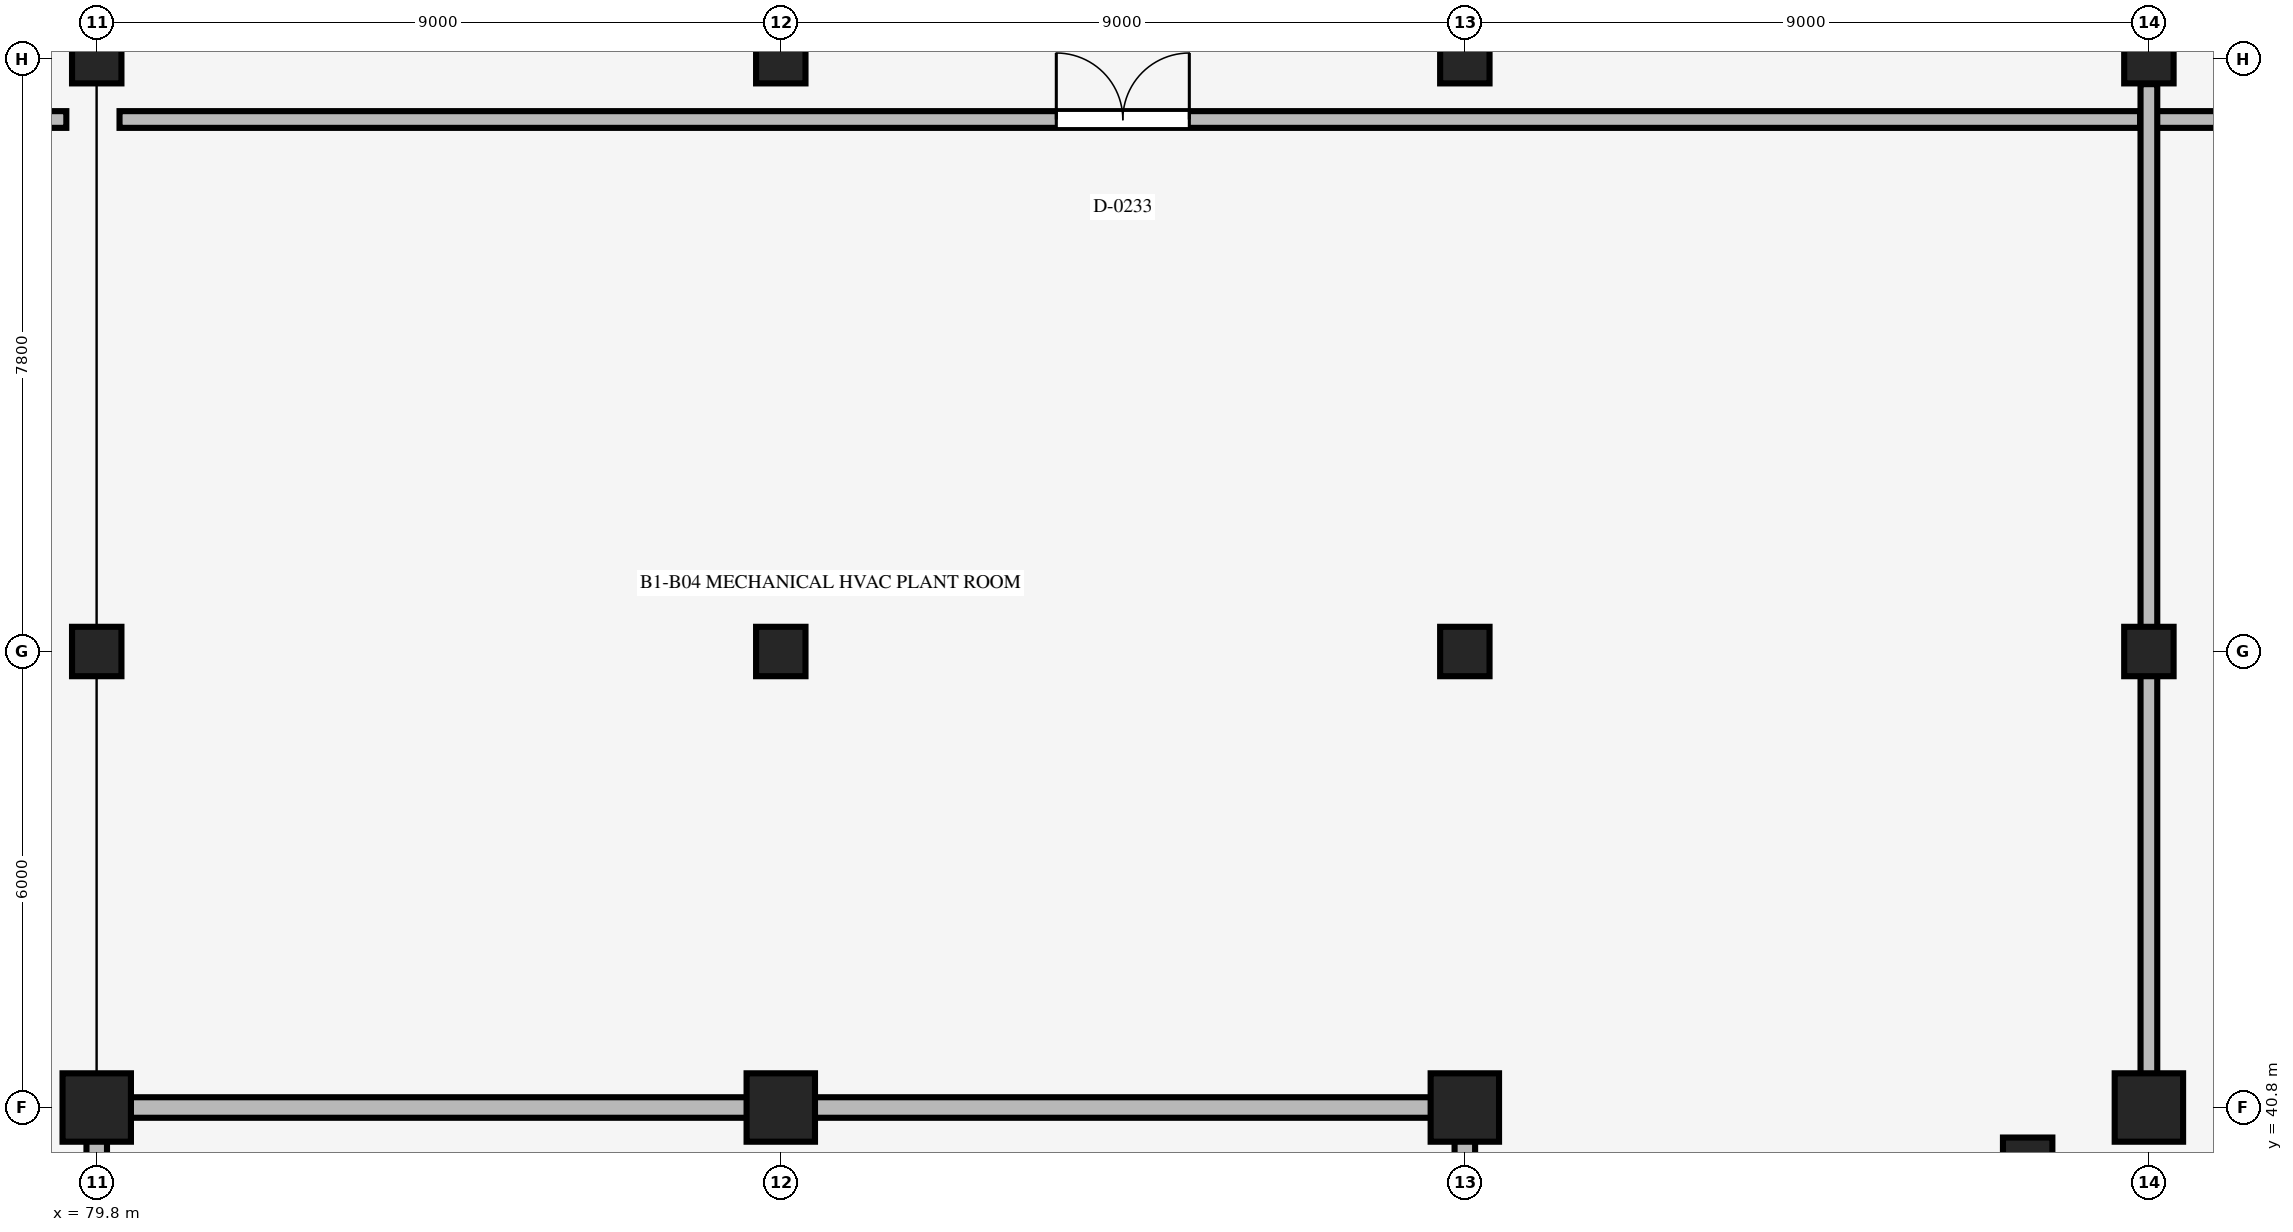
"""IFC4 building model, lengths in metres.
Left out: names, types, materials, properties, quantities, classifications, styles, units other than length and angle.
Written with IfcOpenShell. Run it as: python <this file> out.ifc"""

import sys

from ifc_helpers import new_model, si_unit, direction, frame, frame_2d, origin, origin_2d, place, context, subcontext, project, spatial, rectangle, extrude, element, fill, save


model = new_model("IFC4")
c1 = context("Model", 3, precision=1e-05, world=origin(), true_north=direction((0.0, 1.0)))
c2 = subcontext(c1, "Body", "Model", "MODEL_VIEW")
j1 = project(units=[si_unit("LENGTHUNIT", "METRE"), si_unit("PLANEANGLEUNIT", "RADIAN")], contexts=[c1])
p1 = place(None, origin())
s1 = spatial("IfcSite", under=j1, at=p1, CompositionType="ELEMENT")
p2 = place(p1, origin())
s2 = spatial("IfcBuilding", under=s1, at=p2, CompositionType="ELEMENT")
p3 = place(p2, frame((0.0, 0.0, -4.8)))
s3 = spatial("IfcBuildingStorey", under=s2, at=p3, CompositionType="ELEMENT", Elevation=-4.8)
p4 = place(p3, frame((79.8, 40.8, 0.0), z_axis=(0.0, 0.0, 1.0), x_axis=(1.0, 0.0, 0.0)))
e1 = element("IfcColumn", 1, at=p4, inside=s3, PredefinedType="COLUMN", context=c2, shape_type="SweptSolid", body=[
    extrude(rectangle(XDim=0.9, YDim=0.9, at=origin_2d()), origin(), (0.0, 0.0, 1.0), 4.8),
])
for number, where, z_axis, x_axis in (
    (2, (79.8, 46.8, 0.0), (0.0, 0.0, 1.0), (1.0, 0.0, 0.0)),
    (3, (79.8, 54.6, 0.0), (0.0, 0.0, 1.0), (1.0, 0.0, 0.0)),
):
    element("IfcColumn", number, at=place(p3, frame(where, z_axis=z_axis, x_axis=x_axis)), inside=s3, PredefinedType="COLUMN", context=c2, shape_type="SweptSolid", body=[
        extrude(rectangle(XDim=0.65, YDim=0.65, at=origin_2d()), origin(), (0.0, 0.0, 1.0), 4.8),
    ])
p5 = place(p3, frame((88.8, 40.8, 0.0), z_axis=(0.0, 0.0, 1.0), x_axis=(1.0, 0.0, 0.0)))
e4 = element("IfcColumn", 4, at=p5, inside=s3, PredefinedType="COLUMN", context=c2, shape_type="SweptSolid", body=[
    extrude(rectangle(XDim=0.9, YDim=0.9, at=origin_2d()), origin(), (0.0, 0.0, 1.0), 4.8),
])
for number, where, z_axis, x_axis in (
    (5, (88.8, 46.8, 0.0), (0.0, 0.0, 1.0), (1.0, 0.0, 0.0)),
    (6, (88.8, 54.6, 0.0), (0.0, 0.0, 1.0), (1.0, 0.0, 0.0)),
):
    element("IfcColumn", number, at=place(p3, frame(where, z_axis=z_axis, x_axis=x_axis)), inside=s3, PredefinedType="COLUMN", context=c2, shape_type="SweptSolid", body=[
        extrude(rectangle(XDim=0.65, YDim=0.65, at=origin_2d()), origin(), (0.0, 0.0, 1.0), 4.8),
    ])
p6 = place(p3, frame((97.8, 40.8, 0.0), z_axis=(0.0, 0.0, 1.0), x_axis=(1.0, 0.0, 0.0)))
e7 = element("IfcColumn", 7, at=p6, inside=s3, PredefinedType="COLUMN", context=c2, shape_type="SweptSolid", body=[
    extrude(rectangle(XDim=0.9, YDim=0.9, at=origin_2d()), origin(), (0.0, 0.0, 1.0), 4.8),
])
for number, where, z_axis, x_axis in (
    (8, (97.8, 46.8, 0.0), (0.0, 0.0, 1.0), (1.0, 0.0, 0.0)),
    (9, (97.8, 54.6, 0.0), (0.0, 0.0, 1.0), (1.0, 0.0, 0.0)),
):
    element("IfcColumn", number, at=place(p3, frame(where, z_axis=z_axis, x_axis=x_axis)), inside=s3, PredefinedType="COLUMN", context=c2, shape_type="SweptSolid", body=[
        extrude(rectangle(XDim=0.65, YDim=0.65, at=origin_2d()), origin(), (0.0, 0.0, 1.0), 4.8),
    ])
p7 = place(p3, frame((106.8, 40.8, 0.0), z_axis=(0.0, 0.0, 1.0), x_axis=(1.0, 0.0, 0.0)))
e10 = element("IfcColumn", 10, at=p7, inside=s3, PredefinedType="COLUMN", context=c2, shape_type="SweptSolid", body=[
    extrude(rectangle(XDim=0.9, YDim=0.9, at=origin_2d()), origin(), (0.0, 0.0, 1.0), 4.8),
])
p8 = place(p3, frame((105.205, 40.08, 0.0), z_axis=(0.0, 0.0, 1.0), x_axis=(1.0, 0.0, 0.0)))
e11 = element("IfcColumn", 11, at=p8, inside=s3, PredefinedType="COLUMN", context=c2, shape_type="SweptSolid", body=[
    extrude(rectangle(XDim=0.65, YDim=0.65, at=origin_2d()), origin(), (0.0, 0.0, 1.0), 4.755),
])
for number, where, z_axis, x_axis in (
    (12, (106.8, 46.8, 0.0), (0.0, 0.0, 1.0), (1.0, 0.0, 0.0)),
    (13, (106.8, 54.6, 0.0), (0.0, 0.0, 1.0), (1.0, 0.0, 0.0)),
):
    element("IfcColumn", number, at=place(p3, frame(where, z_axis=z_axis, x_axis=x_axis)), inside=s3, PredefinedType="COLUMN", context=c2, shape_type="SweptSolid", body=[
        extrude(rectangle(XDim=0.65, YDim=0.65, at=origin_2d()), origin(), (0.0, 0.0, 1.0), 4.8),
    ])
p9 = place(p3, frame((97.8, 32.4, 0.0), z_axis=(0.0, 0.0, 1.0), x_axis=(0.0, 1.0, 0.0)))
e14 = element("IfcWall", 14, at=p9, inside=s3, PredefinedType="STANDARD", context=c2, shape_type="SweptSolid", body=[
    extrude(rectangle(XDim=8.4, YDim=0.27, at=frame_2d((4.2, 0.0))), origin(), (0.0, 0.0, 1.0), 4.63),
])
p10 = place(p3, frame((97.8, 40.8, 0.0), z_axis=(0.0, 0.0, 1.0), x_axis=(-1.0, 0.0, 0.0)))
e15 = element("IfcWall", 15, at=p10, inside=s3, PredefinedType="STANDARD", context=c2, shape_type="SweptSolid", body=[
    extrude(rectangle(XDim=18.0, YDim=0.27, at=frame_2d((9.0, 0.0))), origin(), (0.0, 0.0, 1.0), 3.711),
])
p11 = place(p3, frame((79.8, 40.8, 0.0), z_axis=(0.0, 0.0, 1.0), x_axis=(0.0, -1.0, 0.0)))
e16 = element("IfcWall", 16, at=p11, inside=s3, PredefinedType="STANDARD", context=c2, shape_type="SweptSolid", body=[
    extrude(rectangle(XDim=8.4, YDim=0.27, at=frame_2d((4.2, 0.0))), origin(), (0.0, 0.0, 1.0), 4.011),
])
p12 = place(p3, frame((54.9, 53.8, 0.0), z_axis=(0.0, 0.0, 1.0), x_axis=(1.0, 0.0, 0.0)))
e17 = element("IfcWall", 17, at=p12, inside=s3, PredefinedType="STANDARD", context=c2, shape_type="SweptSolid", body=[
    extrude(rectangle(XDim=24.5, YDim=0.22, at=frame_2d((12.25, 0.0))), origin(), (0.0, 0.0, 1.0), 3.1),
])
p13 = place(p12, frame((11.775, 0.0, 0.0)))
e18 = element("IfcOpeningElement", 18, at=p13, cuts=e17, PredefinedType="OPENING", context=c2, shape_type="SweptSolid", body=[
    extrude(rectangle(XDim=0.95, YDim=2.15, at=frame_2d((0.475, 1.075))), frame((0.0, 0.12, 0.0), z_axis=(0.0, -1.0, 0.0), x_axis=(1.0, 0.0, 0.0)), (0.0, 0.0, 1.0), 0.24),
])
p14 = place(p3, frame((80.1, 53.8, 0.0), z_axis=(0.0, 0.0, 1.0), x_axis=(1.0, 0.0, 0.0)))
e19 = element("IfcWall", 19, at=p14, inside=s3, PredefinedType="STANDARD", context=c2, shape_type="SweptSolid", body=[
    extrude(rectangle(XDim=26.585, YDim=0.22, at=frame_2d((13.292, 0.0))), origin(), (0.0, 0.0, 1.0), 3.1),
])
p15 = place(p14, frame((12.325, 0.0, 0.0)))
e20 = element("IfcOpeningElement", 20, at=p15, cuts=e19, PredefinedType="OPENING", context=c2, shape_type="SweptSolid", body=[
    extrude(rectangle(XDim=1.75, YDim=2.4, at=frame_2d((0.875, 1.2))), frame((0.0, 0.12, 0.0), z_axis=(0.0, -1.0, 0.0), x_axis=(1.0, 0.0, 0.0)), (0.0, 0.0, 1.0), 0.24),
])
p16 = place(p3, frame((106.69, 53.8, 0.0), z_axis=(0.0, 0.0, 1.0), x_axis=(1.0, 0.0, 0.0)))
e21 = element("IfcWall", 21, at=p16, inside=s3, PredefinedType="STANDARD", context=c2, shape_type="SweptSolid", body=[
    extrude(rectangle(XDim=26.995, YDim=0.22, at=frame_2d((13.498, 0.0))), origin(), (0.0, 0.0, 1.0), 3.1),
])
p17 = place(p16, frame((13.085, 0.0, 0.0)))
e22 = element("IfcOpeningElement", 22, at=p17, cuts=e21, PredefinedType="OPENING", context=c2, shape_type="SweptSolid", body=[
    extrude(rectangle(XDim=0.95, YDim=2.15, at=frame_2d((0.475, 1.075))), frame((0.0, 0.12, 0.0), z_axis=(0.0, -1.0, 0.0), x_axis=(1.0, 0.0, 0.0)), (0.0, 0.0, 1.0), 0.24),
])
p18 = place(p3, frame((106.8, 41.1, 0.0), z_axis=(0.0, 0.0, 1.0), x_axis=(0.0, 1.0, 0.0)))
e23 = element("IfcWall", 23, at=p18, inside=s3, PredefinedType="STANDARD", context=c2, shape_type="SweptSolid", body=[
    extrude(rectangle(XDim=13.165, YDim=0.22, at=frame_2d((6.583, 0.0))), origin(), (0.0, 0.0, 1.0), 3.1),
])
p19 = place(p15, origin())
e24 = element("IfcDoor", 24, at=p19, inside=s3, OperationType="DOUBLE_DOOR_SINGLE_SWING", PredefinedType="DOOR", context=c2, shape_type="SweptSolid", body=[
    extrude(rectangle(XDim=1.75, YDim=2.4, at=frame_2d((0.875, 1.2))), frame((0.0, 0.025, 0.0), z_axis=(0.0, -1.0, 0.0), x_axis=(1.0, 0.0, 0.0)), (0.0, 0.0, 1.0), 0.05),
])
fill(e20, e24)
save(model, sys.argv[1])
